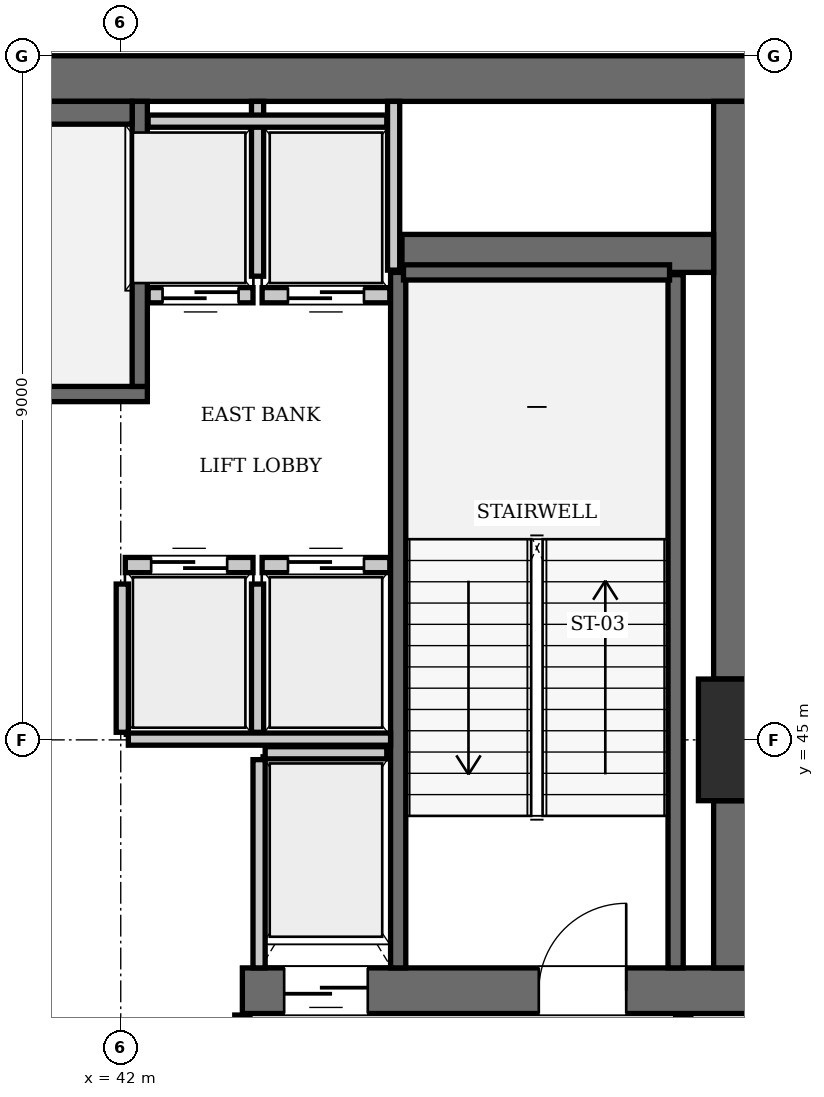
"""IFC4 building model, lengths in metres.
Left out: names, types, materials, properties, quantities, classifications, styles, units other than length and angle.
Written with IfcOpenShell. Run it as: python <this file> out.ifc"""

import sys

from ifc_helpers import new_model, si_unit, direction, frame, frame_2d, origin, origin_2d, place, context, subcontext, project, spatial, rectangle, extrude, element, fill, save


model = new_model("IFC4")
c1 = context("Model", 3, precision=1e-05, world=origin(), true_north=direction((0.0, 1.0)))
c2 = subcontext(c1, "Body", "Model", "MODEL_VIEW")
j1 = project(units=[si_unit("LENGTHUNIT", "METRE"), si_unit("PLANEANGLEUNIT", "RADIAN")], contexts=[c1])
p1 = place(None, origin())
s1 = spatial("IfcSite", under=j1, at=p1, CompositionType="ELEMENT")
p2 = place(p1, origin())
s2 = spatial("IfcBuilding", under=s1, at=p2, CompositionType="ELEMENT")
p3 = place(p2, frame((0.0, 0.0, 234.5)))
s3 = spatial("IfcBuildingStorey", under=s2, at=p3, CompositionType="ELEMENT", Elevation=234.5)
p4 = place(p3, frame((50.4, 45.0, 0.0), z_axis=(0.0, 0.0, 1.0), x_axis=(1.0, 0.0, 0.0)))
e1 = element("IfcColumn", 1, at=p4, inside=s3, PredefinedType="COLUMN", context=c2, shape_type="SweptSolid", body=[
    extrude(rectangle(XDim=1.6, YDim=1.6, at=origin_2d()), origin(), (0.0, 0.0, 1.0), 4.9),
])
p5 = place(p3, frame((25.2, 53.7, 0.0), z_axis=(0.0, 0.0, 1.0), x_axis=(1.0, 0.0, 0.0)))
e2 = element("IfcWall", 2, at=p5, inside=s3, PredefinedType="SHEAR", context=c2, shape_type="SweptSolid", body=[
    extrude(rectangle(XDim=25.2, YDim=0.6, at=frame_2d((12.6, 0.0))), origin(), (0.0, 0.0, 1.0), 4.9),
])
p6 = place(p3, frame((43.6, 41.7, 0.0), z_axis=(0.0, 0.0, 1.0), x_axis=(1.0, 0.0, 0.0)))
e3 = element("IfcWall", 3, at=p6, inside=s3, PredefinedType="SHEAR", context=c2, shape_type="SweptSolid", body=[
    extrude(rectangle(XDim=6.8, YDim=0.6, at=frame_2d((3.4, 0.0))), origin(), (0.0, 0.0, 1.0), 4.9),
])
p7 = place(p6, frame((3.9, 0.0, 0.0)))
e4 = element("IfcOpeningElement", 4, at=p7, cuts=e3, PredefinedType="OPENING", context=c2, shape_type="SweptSolid", body=[
    extrude(rectangle(XDim=1.15, YDim=2.15, at=frame_2d((0.575, 1.075))), frame((0.0, 0.31, 0.0), z_axis=(0.0, -1.0, 0.0), x_axis=(1.0, 0.0, 0.0)), (0.0, 0.0, 1.0), 0.62),
])
p8 = place(p6, frame((0.55, 0.0, 0.0)))
e5 = element("IfcOpeningElement", 5, at=p8, cuts=e3, PredefinedType="OPENING", context=c2, shape_type="SweptSolid", body=[
    extrude(rectangle(XDim=1.1, YDim=2.2, at=frame_2d((0.55, 1.1))), frame((0.0, 0.31, 0.0), z_axis=(0.0, -1.0, 0.0), x_axis=(1.0, 0.0, 0.0)), (0.0, 0.0, 1.0), 0.62),
])
p9 = place(p3, frame((50.1, 42.0, 0.0), z_axis=(0.0, 0.0, 1.0), x_axis=(0.0, 1.0, 0.0)))
e6 = element("IfcWall", 6, at=p9, inside=s3, PredefinedType="SHEAR", context=c2, shape_type="SweptSolid", body=[
    extrude(rectangle(XDim=2.2, YDim=0.6, at=frame_2d((1.1, 0.0))), origin(), (0.0, 0.0, 1.0), 4.9),
])
p10 = place(p3, frame((50.1, 45.8, 0.0), z_axis=(0.0, 0.0, 1.0), x_axis=(0.0, 1.0, 0.0)))
e7 = element("IfcWall", 7, at=p10, inside=s3, PredefinedType="SHEAR", context=c2, shape_type="SweptSolid", body=[
    extrude(rectangle(XDim=7.6, YDim=0.6, at=frame_2d((3.8, 0.0))), origin(), (0.0, 0.0, 1.0), 4.9),
])
p11 = place(p3, frame((45.7, 51.4, 0.0), z_axis=(0.0, 0.0, 1.0), x_axis=(1.0, 0.0, 0.0)))
e8 = element("IfcWall", 8, at=p11, inside=s3, PredefinedType="SHEAR", context=c2, shape_type="SweptSolid", body=[
    extrude(rectangle(XDim=4.1, YDim=0.5, at=frame_2d((2.05, 0.0))), origin(), (0.0, 0.0, 1.0), 4.9),
])
p12 = place(p3, frame((33.25, 49.55, 0.0), z_axis=(0.0, 0.0, 1.0), x_axis=(1.0, 0.0, 0.0)))
e9 = element("IfcWall", 9, at=p12, inside=s3, PredefinedType="SOLIDWALL", context=c2, shape_type="SweptSolid", body=[
    extrude(rectangle(XDim=9.1, YDim=0.2, at=frame_2d((4.55, 0.0))), origin(), (0.0, 0.0, 1.0), 4.66),
])
p13 = place(p3, frame((42.25, 49.65, 0.0), z_axis=(0.0, 0.0, 1.0), x_axis=(0.0, 1.0, 0.0)))
e10 = element("IfcWall", 10, at=p13, inside=s3, PredefinedType="SOLIDWALL", context=c2, shape_type="SweptSolid", body=[
    extrude(rectangle(XDim=3.75, YDim=0.2, at=frame_2d((1.875, 0.0))), origin(), (0.0, 0.0, 1.0), 4.66),
])
p14 = place(p3, frame((33.45, 53.25, 0.0), z_axis=(0.0, 0.0, 1.0), x_axis=(1.0, 0.0, 0.0)))
e11 = element("IfcWall", 11, at=p14, inside=s3, PredefinedType="SOLIDWALL", context=c2, shape_type="SweptSolid", body=[
    extrude(rectangle(XDim=8.7, YDim=0.3, at=frame_2d((4.35, 0.0))), origin(), (0.0, 0.0, 1.0), 4.66),
])
p15 = place(p3, frame((45.65, 42.0, 0.0), z_axis=(0.0, 0.0, 1.0), x_axis=(0.0, 1.0, 0.0)))
e12 = element("IfcWall", 12, at=p15, inside=s3, PredefinedType="SOLIDWALL", context=c2, shape_type="SweptSolid", body=[
    extrude(rectangle(XDim=9.15, YDim=0.2, at=frame_2d((4.575, 0.0))), origin(), (0.0, 0.0, 1.0), 4.66),
])
p16 = place(p3, frame((49.3, 42.0, 0.0), z_axis=(0.0, 0.0, 1.0), x_axis=(0.0, 1.0, 0.0)))
e13 = element("IfcWall", 13, at=p16, inside=s3, PredefinedType="SOLIDWALL", context=c2, shape_type="SweptSolid", body=[
    extrude(rectangle(XDim=9.12, YDim=0.2, at=frame_2d((4.56, 0.0))), origin(), (0.0, 0.0, 1.0), 4.66),
])
p17 = place(p3, frame((45.72, 51.15, 0.0), z_axis=(0.0, 0.0, 1.0), x_axis=(1.0, 0.0, 0.0)))
e14 = element("IfcWall", 14, at=p17, inside=s3, PredefinedType="SOLIDWALL", context=c2, shape_type="SweptSolid", body=[
    extrude(rectangle(XDim=3.5, YDim=0.2, at=frame_2d((1.75, 0.0))), origin(), (0.0, 0.0, 1.0), 4.66),
])
p18 = place(p3, frame((42.06, 47.3, 0.0), z_axis=(0.0, 0.0, 1.0), x_axis=(1.0, 0.0, 0.0)))
e15 = element("IfcWall", 15, at=p18, inside=s3, PredefinedType="SOLIDWALL", context=c2, shape_type="SweptSolid", body=[
    extrude(rectangle(XDim=1.68, YDim=0.2, at=frame_2d((0.84, 0.0))), origin(), (0.0, 0.0, 1.0), 4.66),
])
p19 = place(p18, frame((0.34, 0.0, 0.0)))
e16 = element("IfcOpeningElement", 16, at=p19, cuts=e15, PredefinedType="OPENING", context=c2, shape_type="SweptSolid", body=[
    extrude(rectangle(XDim=1.0, YDim=2.15, at=frame_2d((0.5, 1.075))), frame((0.0, 0.11, 0.0), z_axis=(0.0, -1.0, 0.0), x_axis=(1.0, 0.0, 0.0)), (0.0, 0.0, 1.0), 0.22),
])
p20 = place(p3, frame((43.86, 47.3, 0.0), z_axis=(0.0, 0.0, 1.0), x_axis=(1.0, 0.0, 0.0)))
e17 = element("IfcWall", 17, at=p20, inside=s3, PredefinedType="SOLIDWALL", context=c2, shape_type="SweptSolid", body=[
    extrude(rectangle(XDim=1.68, YDim=0.2, at=frame_2d((0.84, 0.0))), origin(), (0.0, 0.0, 1.0), 4.66),
])
p21 = place(p20, frame((0.34, 0.0, 0.0)))
e18 = element("IfcOpeningElement", 18, at=p21, cuts=e17, PredefinedType="OPENING", context=c2, shape_type="SweptSolid", body=[
    extrude(rectangle(XDim=1.0, YDim=2.15, at=frame_2d((0.5, 1.075))), frame((0.0, 0.11, 0.0), z_axis=(0.0, -1.0, 0.0), x_axis=(1.0, 0.0, 0.0)), (0.0, 0.0, 1.0), 0.22),
])
p22 = place(p3, frame((42.36, 50.85, 0.0), z_axis=(0.0, 0.0, 1.0), x_axis=(1.0, 0.0, 0.0)))
e19 = element("IfcWall", 19, at=p22, inside=s3, PredefinedType="SOLIDWALL", context=c2, shape_type="SweptSolid", body=[
    extrude(rectangle(XDim=1.38, YDim=0.2, at=frame_2d((0.69, 0.0))), origin(), (0.0, 0.0, 1.0), 4.66),
])
p23 = place(p22, frame((0.19, 0.0, 0.0)))
e20 = element("IfcOpeningElement", 20, at=p23, cuts=e19, PredefinedType="OPENING", context=c2, shape_type="SweptSolid", body=[
    extrude(rectangle(XDim=1.0, YDim=2.15, at=frame_2d((0.5, 1.075))), frame((0.0, 0.11, 0.0), z_axis=(0.0, -1.0, 0.0), x_axis=(1.0, 0.0, 0.0)), (0.0, 0.0, 1.0), 0.22),
])
p24 = place(p3, frame((43.86, 50.85, 0.0), z_axis=(0.0, 0.0, 1.0), x_axis=(1.0, 0.0, 0.0)))
e21 = element("IfcWall", 21, at=p24, inside=s3, PredefinedType="SOLIDWALL", context=c2, shape_type="SweptSolid", body=[
    extrude(rectangle(XDim=1.68, YDim=0.2, at=frame_2d((0.84, 0.0))), origin(), (0.0, 0.0, 1.0), 4.66),
])
p25 = place(p24, frame((0.34, 0.0, 0.0)))
e22 = element("IfcOpeningElement", 22, at=p25, cuts=e21, PredefinedType="OPENING", context=c2, shape_type="SweptSolid", body=[
    extrude(rectangle(XDim=1.0, YDim=2.15, at=frame_2d((0.5, 1.075))), frame((0.0, 0.11, 0.0), z_axis=(0.0, -1.0, 0.0), x_axis=(1.0, 0.0, 0.0)), (0.0, 0.0, 1.0), 0.22),
])
p26 = place(p3, frame((43.9, 44.83, 0.0), z_axis=(0.0, 0.0, 1.0), x_axis=(1.0, 0.0, 0.0)))
e23 = element("IfcWall", 23, at=p26, inside=s3, PredefinedType="SOLIDWALL", context=c2, shape_type="SweptSolid", body=[
    extrude(rectangle(XDim=1.6, YDim=0.16, at=frame_2d((0.8, 0.0))), origin(), (0.0, 0.0, 1.0), 4.66),
])
p27 = place(p3, frame((43.82, 42.0, 0.0), z_axis=(0.0, 0.0, 1.0), x_axis=(0.0, 1.0, 0.0)))
e24 = element("IfcWall", 24, at=p27, inside=s3, PredefinedType="SOLIDWALL", context=c2, shape_type="SweptSolid", body=[
    extrude(rectangle(XDim=2.74, YDim=0.16, at=frame_2d((1.37, 0.0))), origin(), (0.0, 0.0, 1.0), 4.66),
])
for number, where, z_axis, x_axis in (
    (25, (42.02, 45.1, 0.0), (0.0, 0.0, 1.0), (0.0, 1.0, 0.0)),
    (26, (43.8, 45.1, 0.0), (0.0, 0.0, 1.0), (0.0, 1.0, 0.0)),
):
    element("IfcWall", number, at=place(p3, frame(where, z_axis=z_axis, x_axis=x_axis)), inside=s3, PredefinedType="SOLIDWALL", context=c2, shape_type="SweptSolid", body=[
        extrude(rectangle(XDim=1.95, YDim=0.16, at=frame_2d((0.975, 0.0))), origin(), (0.0, 0.0, 1.0), 4.66),
    ])
p28 = place(p3, frame((42.1, 45.01, 0.0), z_axis=(0.0, 0.0, 1.0), x_axis=(1.0, 0.0, 0.0)))
e27 = element("IfcWall", 27, at=p28, inside=s3, PredefinedType="SOLIDWALL", context=c2, shape_type="SweptSolid", body=[
    extrude(rectangle(XDim=3.45, YDim=0.16, at=frame_2d((1.725, 0.0))), origin(), (0.0, 0.0, 1.0), 4.66),
])
p29 = place(p3, frame((45.59, 51.18, 0.0), z_axis=(0.0, 0.0, 1.0), x_axis=(0.0, 1.0, 0.0)))
e28 = element("IfcWall", 28, at=p29, inside=s3, PredefinedType="SOLIDWALL", context=c2, shape_type="SweptSolid", body=[
    extrude(rectangle(XDim=2.22, YDim=0.16, at=frame_2d((1.11, 0.0))), origin(), (0.0, 0.0, 1.0), 4.66),
])
p30 = place(p3, frame((43.8, 51.1, 0.0), z_axis=(0.0, 0.0, 1.0), x_axis=(0.0, 1.0, 0.0)))
e29 = element("IfcWall", 29, at=p30, inside=s3, PredefinedType="SOLIDWALL", context=c2, shape_type="SweptSolid", body=[
    extrude(rectangle(XDim=2.3, YDim=0.16, at=frame_2d((1.15, 0.0))), origin(), (0.0, 0.0, 1.0), 4.66),
])
p31 = place(p3, frame((42.36, 53.14, 0.0), z_axis=(0.0, 0.0, 1.0), x_axis=(1.0, 0.0, 0.0)))
e30 = element("IfcWall", 30, at=p31, inside=s3, PredefinedType="SOLIDWALL", context=c2, shape_type="SweptSolid", body=[
    extrude(rectangle(XDim=3.14, YDim=0.16, at=frame_2d((1.57, 0.0))), origin(), (0.0, 0.0, 1.0), 4.66),
])
for number, where, z_axis, x_axis in (
    (31, (43.6, 38.31, 0.0), (0.0, 0.0, 1.0), (0.0, 1.0, 0.0)),
    (32, (49.4, 38.31, 0.0), (0.0, 0.0, 1.0), (0.0, 1.0, 0.0)),
):
    element("IfcWall", number, at=place(p3, frame(where, z_axis=z_axis, x_axis=x_axis)), inside=s3, PredefinedType="PARTITIONING", context=c2, shape_type="SweptSolid", body=[
        extrude(rectangle(XDim=3.07, YDim=0.2, at=frame_2d((1.535, 0.0))), origin(), (0.0, 0.0, 1.0), 4.66),
    ])
p32 = place(p7, origin())
e33 = element("IfcDoor", 33, at=p32, inside=s3, OperationType="SINGLE_SWING_RIGHT", PredefinedType="DOOR", context=c2, shape_type="SweptSolid", body=[
    extrude(rectangle(XDim=1.15, YDim=2.15, at=frame_2d((0.575, 1.075))), frame((0.0, 0.025, 0.0), z_axis=(0.0, -1.0, 0.0), x_axis=(1.0, 0.0, 0.0)), (0.0, 0.0, 1.0), 0.05),
])
fill(e4, e33)
p33 = place(p19, origin())
e34 = element("IfcDoor", 34, at=p33, inside=s3, OperationType="SLIDING_TO_LEFT", PredefinedType="DOOR", context=c2, shape_type="SweptSolid", body=[
    extrude(rectangle(XDim=1.0, YDim=2.15, at=frame_2d((0.5, 1.075))), frame((0.0, 0.025, 0.0), z_axis=(0.0, -1.0, 0.0), x_axis=(1.0, 0.0, 0.0)), (0.0, 0.0, 1.0), 0.05),
])
fill(e16, e34)
p34 = place(p21, origin())
e35 = element("IfcDoor", 35, at=p34, inside=s3, OperationType="SLIDING_TO_LEFT", PredefinedType="DOOR", context=c2, shape_type="SweptSolid", body=[
    extrude(rectangle(XDim=1.0, YDim=2.15, at=frame_2d((0.5, 1.075))), frame((0.0, 0.025, 0.0), z_axis=(0.0, -1.0, 0.0), x_axis=(1.0, 0.0, 0.0)), (0.0, 0.0, 1.0), 0.05),
])
fill(e18, e35)
p35 = place(p23, frame((1.0, 0.0, 0.0), z_axis=(0.0, 0.0, 1.0), x_axis=(-1.0, 0.0, 0.0)))
e36 = element("IfcDoor", 36, at=p35, inside=s3, OperationType="SLIDING_TO_LEFT", PredefinedType="DOOR", context=c2, shape_type="SweptSolid", body=[
    extrude(rectangle(XDim=1.0, YDim=2.15, at=frame_2d((0.5, 1.075))), frame((0.0, 0.025, 0.0), z_axis=(0.0, -1.0, 0.0), x_axis=(1.0, 0.0, 0.0)), (0.0, 0.0, 1.0), 0.05),
])
fill(e20, e36)
p36 = place(p25, frame((1.0, 0.0, 0.0), z_axis=(0.0, 0.0, 1.0), x_axis=(-1.0, 0.0, 0.0)))
e37 = element("IfcDoor", 37, at=p36, inside=s3, OperationType="SLIDING_TO_LEFT", PredefinedType="DOOR", context=c2, shape_type="SweptSolid", body=[
    extrude(rectangle(XDim=1.0, YDim=2.15, at=frame_2d((0.5, 1.075))), frame((0.0, 0.025, 0.0), z_axis=(0.0, -1.0, 0.0), x_axis=(1.0, 0.0, 0.0)), (0.0, 0.0, 1.0), 0.05),
])
fill(e22, e37)
p37 = place(p8, frame((1.1, 0.0, 0.0), z_axis=(0.0, 0.0, 1.0), x_axis=(-1.0, 0.0, 0.0)))
e38 = element("IfcDoor", 38, at=p37, inside=s3, OperationType="SLIDING_TO_LEFT", PredefinedType="DOOR", context=c2, shape_type="SweptSolid", body=[
    extrude(rectangle(XDim=1.1, YDim=2.2, at=frame_2d((0.55, 1.1))), frame((0.0, 0.025, 0.0), z_axis=(0.0, -1.0, 0.0), x_axis=(1.0, 0.0, 0.0)), (0.0, 0.0, 1.0), 0.05),
])
fill(e5, e38)
save(model, sys.argv[1])
